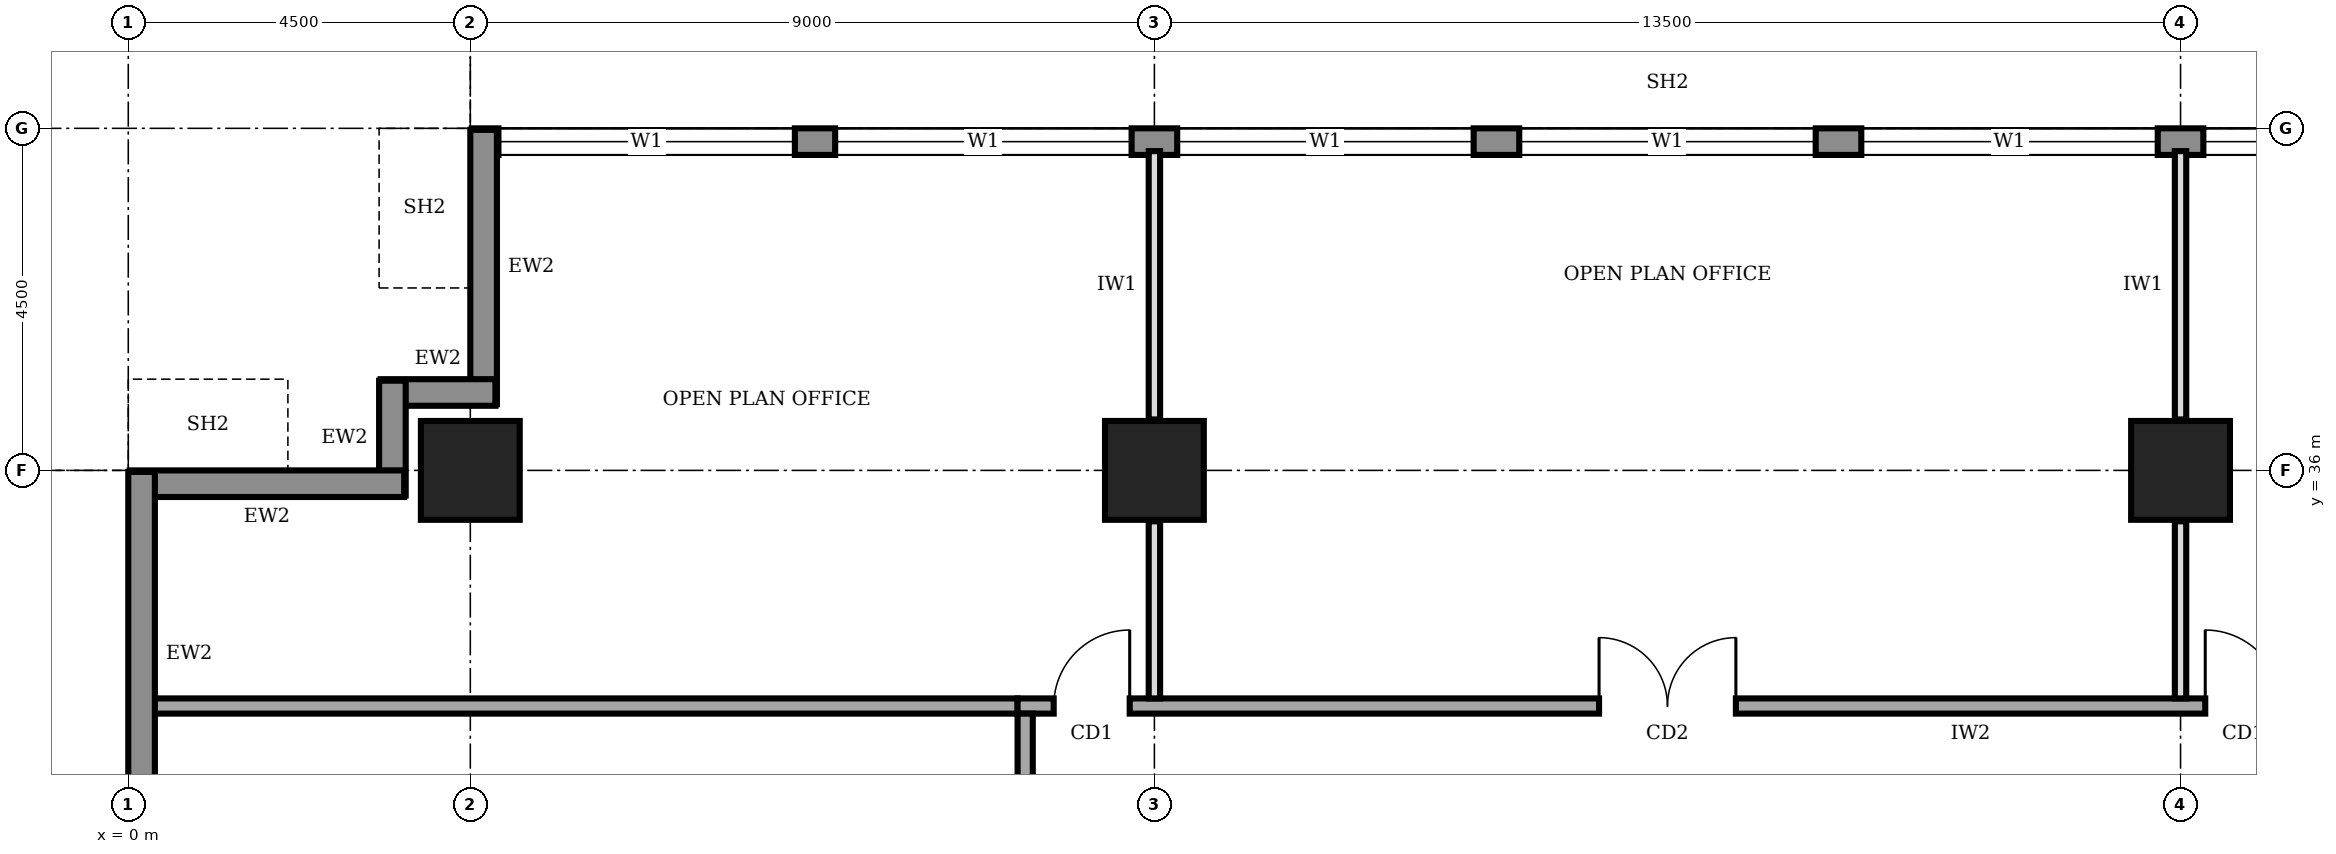
"""IFC4 building model, lengths in metres.
Left out: names, types, materials, properties, quantities, classifications, styles, units other than length and angle.
Written with IfcOpenShell. Run it as: python <this file> out.ifc"""

import sys

from ifc_helpers import new_model, si_unit, direction, frame, frame_2d, origin, origin_2d, place, context, subcontext, project, spatial, rectangle, extrude, element, fill, save


model = new_model("IFC4")
c1 = context("Model", 3, precision=1e-05, world=origin(), true_north=direction((0.0, 1.0)))
c2 = subcontext(c1, "Body", "Model", "MODEL_VIEW")
j1 = project(units=[si_unit("LENGTHUNIT", "METRE"), si_unit("PLANEANGLEUNIT", "RADIAN")], contexts=[c1])
p1 = place(None, origin())
s1 = spatial("IfcSite", under=j1, at=p1, CompositionType="ELEMENT")
p2 = place(p1, origin())
s2 = spatial("IfcBuilding", under=s1, at=p2, CompositionType="ELEMENT")
p3 = place(p2, frame((0.0, 0.0, 281.0)))
s3 = spatial("IfcBuildingStorey", under=s2, at=p3, CompositionType="ELEMENT", Elevation=281.0)
for number, where, z_axis, x_axis in (
    (1, (4.5, 36.0, 0.0), (0.0, 0.0, 1.0), (1.0, 0.0, 0.0)),
    (2, (13.5, 36.0, 0.0), (0.0, 0.0, 1.0), (1.0, 0.0, 0.0)),
    (3, (27.0, 36.0, 0.0), (0.0, 0.0, 1.0), (1.0, 0.0, 0.0)),
):
    element("IfcColumn", number, at=place(p3, frame(where, z_axis=z_axis, x_axis=x_axis)), inside=s3, PredefinedType="COLUMN", context=c2, shape_type="SweptSolid", body=[
        extrude(rectangle(XDim=1.3, YDim=1.3, at=origin_2d()), origin(), (0.0, 0.0, 1.0), 4.0),
    ])
p4 = place(p3, frame((35.98, 40.325, 0.0), z_axis=(0.0, 0.0, 1.0), x_axis=(-1.0, 0.0, 0.0)))
e4 = element("IfcWall", 4, at=p4, inside=s3, PredefinedType="STANDARD", context=c2, shape_type="SweptSolid", body=[
    extrude(rectangle(XDim=31.46, YDim=0.35, at=frame_2d((15.73, 0.0))), origin(), (0.0, 0.0, 1.0), 3.75),
])
p5 = place(p4, frame((27.21, 0.0, 0.9)))
e5 = element("IfcOpeningElement", 5, at=p5, cuts=e4, PredefinedType="OPENING", context=c2, shape_type="SweptSolid", body=[
    extrude(rectangle(XDim=3.9, YDim=2.2, at=frame_2d((1.95, 1.1))), frame((0.0, 0.185, 0.0), z_axis=(0.0, -1.0, 0.0), x_axis=(1.0, 0.0, 0.0)), (0.0, 0.0, 1.0), 0.37),
])
p6 = place(p4, frame((22.78, 0.0, 0.9)))
e6 = element("IfcOpeningElement", 6, at=p6, cuts=e4, PredefinedType="OPENING", context=c2, shape_type="SweptSolid", body=[
    extrude(rectangle(XDim=3.9, YDim=2.2, at=frame_2d((1.95, 1.1))), frame((0.0, 0.185, 0.0), z_axis=(0.0, -1.0, 0.0), x_axis=(1.0, 0.0, 0.0)), (0.0, 0.0, 1.0), 0.37),
])
p7 = place(p4, frame((18.28, 0.0, 0.9)))
e7 = element("IfcOpeningElement", 7, at=p7, cuts=e4, PredefinedType="OPENING", context=c2, shape_type="SweptSolid", body=[
    extrude(rectangle(XDim=3.9, YDim=2.2, at=frame_2d((1.95, 1.1))), frame((0.0, 0.185, 0.0), z_axis=(0.0, -1.0, 0.0), x_axis=(1.0, 0.0, 0.0)), (0.0, 0.0, 1.0), 0.37),
])
p8 = place(p4, frame((13.78, 0.0, 0.9)))
e8 = element("IfcOpeningElement", 8, at=p8, cuts=e4, PredefinedType="OPENING", context=c2, shape_type="SweptSolid", body=[
    extrude(rectangle(XDim=3.9, YDim=2.2, at=frame_2d((1.95, 1.1))), frame((0.0, 0.185, 0.0), z_axis=(0.0, -1.0, 0.0), x_axis=(1.0, 0.0, 0.0)), (0.0, 0.0, 1.0), 0.37),
])
p9 = place(p4, frame((9.28, 0.0, 0.9)))
e9 = element("IfcOpeningElement", 9, at=p9, cuts=e4, PredefinedType="OPENING", context=c2, shape_type="SweptSolid", body=[
    extrude(rectangle(XDim=3.9, YDim=2.2, at=frame_2d((1.95, 1.1))), frame((0.0, 0.185, 0.0), z_axis=(0.0, -1.0, 0.0), x_axis=(1.0, 0.0, 0.0)), (0.0, 0.0, 1.0), 0.37),
])
p10 = place(p4, frame((4.78, 0.0, 0.9)))
e10 = element("IfcOpeningElement", 10, at=p10, cuts=e4, PredefinedType="OPENING", context=c2, shape_type="SweptSolid", body=[
    extrude(rectangle(XDim=3.9, YDim=2.2, at=frame_2d((1.95, 1.1))), frame((0.0, 0.185, 0.0), z_axis=(0.0, -1.0, 0.0), x_axis=(1.0, 0.0, 0.0)), (0.0, 0.0, 1.0), 0.37),
])
p11 = place(p3, frame((4.675, 40.48, 0.0), z_axis=(0.0, 0.0, 1.0), x_axis=(0.0, -1.0, 0.0)))
e11 = element("IfcWall", 11, at=p11, inside=s3, PredefinedType="STANDARD", context=c2, shape_type="SweptSolid", body=[
    extrude(rectangle(XDim=3.61, YDim=0.35, at=frame_2d((1.805, 0.0))), origin(), (0.0, 0.0, 1.0), 2.85),
])
for number, where, z_axis, x_axis in (
    (12, (4.83, 37.025, 0.0), (0.0, 0.0, 1.0), (-1.0, 0.0, 0.0)),
    (13, (3.475, 37.18, 0.0), (0.0, 0.0, 1.0), (0.0, -1.0, 0.0)),
):
    element("IfcWall", number, at=place(p3, frame(where, z_axis=z_axis, x_axis=x_axis)), inside=s3, PredefinedType="STANDARD", context=c2, shape_type="SweptSolid", body=[
        extrude(rectangle(XDim=1.51, YDim=0.35, at=frame_2d((0.755, 0.0))), origin(), (0.0, 0.0, 1.0), 3.75),
    ])
p12 = place(p3, frame((3.63, 35.825, 0.0), z_axis=(0.0, 0.0, 1.0), x_axis=(-1.0, 0.0, 0.0)))
e14 = element("IfcWall", 14, at=p12, inside=s3, PredefinedType="STANDARD", context=c2, shape_type="SweptSolid", body=[
    extrude(rectangle(XDim=3.61, YDim=0.35, at=frame_2d((1.805, 0.0))), origin(), (0.0, 0.0, 1.0), 2.85),
])
p13 = place(p3, frame((0.175, 35.98, 0.0), z_axis=(0.0, 0.0, 1.0), x_axis=(0.0, -1.0, 0.0)))
e15 = element("IfcWall", 15, at=p13, inside=s3, PredefinedType="STANDARD", context=c2, shape_type="SweptSolid", body=[
    extrude(rectangle(XDim=31.46, YDim=0.35, at=frame_2d((15.73, 0.0))), origin(), (0.0, 0.0, 1.0), 3.75),
])
p14 = place(p13, frame((27.21, 0.0, 0.9)))
e16 = element("IfcOpeningElement", 16, at=p14, cuts=e15, PredefinedType="OPENING", context=c2, shape_type="SweptSolid", body=[
    extrude(rectangle(XDim=3.9, YDim=2.2, at=frame_2d((1.95, 1.1))), frame((0.0, 0.185, 0.0), z_axis=(0.0, -1.0, 0.0), x_axis=(1.0, 0.0, 0.0)), (0.0, 0.0, 1.0), 0.37),
])
p15 = place(p13, frame((22.78, 0.0, 0.9)))
e17 = element("IfcOpeningElement", 17, at=p15, cuts=e15, PredefinedType="OPENING", context=c2, shape_type="SweptSolid", body=[
    extrude(rectangle(XDim=3.9, YDim=2.2, at=frame_2d((1.95, 1.1))), frame((0.0, 0.185, 0.0), z_axis=(0.0, -1.0, 0.0), x_axis=(1.0, 0.0, 0.0)), (0.0, 0.0, 1.0), 0.37),
])
p16 = place(p13, frame((18.28, 0.0, 0.9)))
e18 = element("IfcOpeningElement", 18, at=p16, cuts=e15, PredefinedType="OPENING", context=c2, shape_type="SweptSolid", body=[
    extrude(rectangle(XDim=3.9, YDim=2.2, at=frame_2d((1.95, 1.1))), frame((0.0, 0.185, 0.0), z_axis=(0.0, -1.0, 0.0), x_axis=(1.0, 0.0, 0.0)), (0.0, 0.0, 1.0), 0.37),
])
p17 = place(p13, frame((13.78, 0.0, 0.9)))
e19 = element("IfcOpeningElement", 19, at=p17, cuts=e15, PredefinedType="OPENING", context=c2, shape_type="SweptSolid", body=[
    extrude(rectangle(XDim=3.9, YDim=2.2, at=frame_2d((1.95, 1.1))), frame((0.0, 0.185, 0.0), z_axis=(0.0, -1.0, 0.0), x_axis=(1.0, 0.0, 0.0)), (0.0, 0.0, 1.0), 0.37),
])
p18 = place(p13, frame((9.28, 0.0, 0.9)))
e20 = element("IfcOpeningElement", 20, at=p18, cuts=e15, PredefinedType="OPENING", context=c2, shape_type="SweptSolid", body=[
    extrude(rectangle(XDim=3.9, YDim=2.2, at=frame_2d((1.95, 1.1))), frame((0.0, 0.185, 0.0), z_axis=(0.0, -1.0, 0.0), x_axis=(1.0, 0.0, 0.0)), (0.0, 0.0, 1.0), 0.37),
])
p19 = place(p13, frame((4.78, 0.0, 0.9)))
e21 = element("IfcOpeningElement", 21, at=p19, cuts=e15, PredefinedType="OPENING", context=c2, shape_type="SweptSolid", body=[
    extrude(rectangle(XDim=3.9, YDim=2.2, at=frame_2d((1.95, 1.1))), frame((0.0, 0.185, 0.0), z_axis=(0.0, -1.0, 0.0), x_axis=(1.0, 0.0, 0.0)), (0.0, 0.0, 1.0), 0.37),
])
p20 = place(p3, frame((28.6, 32.9, 0.0), z_axis=(0.0, 0.0, 1.0), x_axis=(-1.0, 0.0, 0.0)))
e22 = element("IfcWall", 22, at=p20, inside=s3, PredefinedType="SOLIDWALL", context=c2, shape_type="SweptSolid", body=[
    extrude(rectangle(XDim=16.9, YDim=0.2, at=frame_2d((8.45, 0.0))), origin(), (0.0, 0.0, 1.0), 3.75),
])
p21 = place(p20, frame((15.425, 0.0, 0.0)))
e23 = element("IfcOpeningElement", 23, at=p21, cuts=e22, PredefinedType="OPENING", context=c2, shape_type="SweptSolid", body=[
    extrude(rectangle(XDim=1.0, YDim=2.1, at=frame_2d((0.5, 1.05))), frame((0.0, 0.11, 0.0), z_axis=(0.0, -1.0, 0.0), x_axis=(1.0, 0.0, 0.0)), (0.0, 0.0, 1.0), 0.22),
])
p22 = place(p20, frame((7.45, 0.0, 0.0)))
e24 = element("IfcOpeningElement", 24, at=p22, cuts=e22, PredefinedType="OPENING", context=c2, shape_type="SweptSolid", body=[
    extrude(rectangle(XDim=1.8, YDim=2.1, at=frame_2d((0.9, 1.05))), frame((0.0, 0.11, 0.0), z_axis=(0.0, -1.0, 0.0), x_axis=(1.0, 0.0, 0.0)), (0.0, 0.0, 1.0), 0.22),
])
p23 = place(p20, frame((0.275, 0.0, 0.0)))
e25 = element("IfcOpeningElement", 25, at=p23, cuts=e22, PredefinedType="OPENING", context=c2, shape_type="SweptSolid", body=[
    extrude(rectangle(XDim=1.0, YDim=2.1, at=frame_2d((0.5, 1.05))), frame((0.0, 0.11, 0.0), z_axis=(0.0, -1.0, 0.0), x_axis=(1.0, 0.0, 0.0)), (0.0, 0.0, 1.0), 0.22),
])
p24 = place(p3, frame((11.8, 32.8, 0.0), z_axis=(0.0, 0.0, 1.0), x_axis=(0.0, -1.0, 0.0)))
e26 = element("IfcWall", 26, at=p24, inside=s3, PredefinedType="SOLIDWALL", context=c2, shape_type="SweptSolid", body=[
    extrude(rectangle(XDim=23.8, YDim=0.2, at=frame_2d((11.9, 0.0))), origin(), (0.0, 0.0, 1.0), 3.75),
])
p25 = place(p24, frame((21.05, 0.0, 0.0)))
e27 = element("IfcOpeningElement", 27, at=p25, cuts=e26, PredefinedType="OPENING", context=c2, shape_type="SweptSolid", body=[
    extrude(rectangle(XDim=1.0, YDim=2.1, at=frame_2d((0.5, 1.05))), frame((0.0, 0.11, 0.0), z_axis=(0.0, -1.0, 0.0), x_axis=(1.0, 0.0, 0.0)), (0.0, 0.0, 1.0), 0.22),
])
p26 = place(p24, frame((17.65, 0.0, 0.0)))
e28 = element("IfcOpeningElement", 28, at=p26, cuts=e26, PredefinedType="OPENING", context=c2, shape_type="SweptSolid", body=[
    extrude(rectangle(XDim=0.9, YDim=2.1, at=frame_2d((0.45, 1.05))), frame((0.0, 0.11, 0.0), z_axis=(0.0, -1.0, 0.0), x_axis=(1.0, 0.0, 0.0)), (0.0, 0.0, 1.0), 0.22),
])
p27 = place(p24, frame((14.45, 0.0, 0.0)))
e29 = element("IfcOpeningElement", 29, at=p27, cuts=e26, PredefinedType="OPENING", context=c2, shape_type="SweptSolid", body=[
    extrude(rectangle(XDim=0.9, YDim=2.1, at=frame_2d((0.45, 1.05))), frame((0.0, 0.11, 0.0), z_axis=(0.0, -1.0, 0.0), x_axis=(1.0, 0.0, 0.0)), (0.0, 0.0, 1.0), 0.22),
])
p28 = place(p24, frame((8.9, 0.0, 0.0)))
e30 = element("IfcOpeningElement", 30, at=p28, cuts=e26, PredefinedType="OPENING", context=c2, shape_type="SweptSolid", body=[
    extrude(rectangle(XDim=0.9, YDim=2.1, at=frame_2d((0.45, 1.05))), frame((0.0, 0.11, 0.0), z_axis=(0.0, -1.0, 0.0), x_axis=(1.0, 0.0, 0.0)), (0.0, 0.0, 1.0), 0.22),
])
p29 = place(p24, frame((6.3, 0.0, 0.0)))
e31 = element("IfcOpeningElement", 31, at=p29, cuts=e26, PredefinedType="OPENING", context=c2, shape_type="SweptSolid", body=[
    extrude(rectangle(XDim=1.0, YDim=2.1, at=frame_2d((0.5, 1.05))), frame((0.0, 0.11, 0.0), z_axis=(0.0, -1.0, 0.0), x_axis=(1.0, 0.0, 0.0)), (0.0, 0.0, 1.0), 0.22),
])
p30 = place(p24, frame((11.4, 0.0, 0.0)))
e32 = element("IfcOpeningElement", 32, at=p30, cuts=e26, PredefinedType="OPENING", context=c2, shape_type="SweptSolid", body=[
    extrude(rectangle(XDim=1.0, YDim=2.1, at=frame_2d((0.5, 1.05))), frame((0.0, 0.11, 0.0), z_axis=(0.0, -1.0, 0.0), x_axis=(1.0, 0.0, 0.0)), (0.0, 0.0, 1.0), 0.22),
])
p31 = place(p24, frame((2.3, 0.0, 0.0)))
e33 = element("IfcOpeningElement", 33, at=p31, cuts=e26, PredefinedType="OPENING", context=c2, shape_type="SweptSolid", body=[
    extrude(rectangle(XDim=1.0, YDim=2.1, at=frame_2d((0.5, 1.05))), frame((0.0, 0.11, 0.0), z_axis=(0.0, -1.0, 0.0), x_axis=(1.0, 0.0, 0.0)), (0.0, 0.0, 1.0), 0.22),
])
p32 = place(p3, frame((0.3, 32.9, 0.0), z_axis=(0.0, 0.0, 1.0), x_axis=(1.0, 0.0, 0.0)))
e34 = element("IfcWall", 34, at=p32, inside=s3, PredefinedType="SOLIDWALL", context=c2, shape_type="SweptSolid", body=[
    extrude(rectangle(XDim=11.4, YDim=0.2, at=frame_2d((5.7, 0.0))), origin(), (0.0, 0.0, 1.0), 3.75),
])
p33 = place(p3, frame((13.5, 33.0, 0.0), z_axis=(0.0, 0.0, 1.0), x_axis=(0.0, 1.0, 0.0)))
e35 = element("IfcWall", 35, at=p33, inside=s3, PredefinedType="PARTITIONING", context=c2, shape_type="SweptSolid", body=[
    extrude(rectangle(XDim=2.33, YDim=0.15, at=frame_2d((1.165, 0.0))), origin(), (0.0, 0.0, 1.0), 2.85),
])
p34 = place(p3, frame((13.5, 36.67, 0.0), z_axis=(0.0, 0.0, 1.0), x_axis=(0.0, 1.0, 0.0)))
e36 = element("IfcWall", 36, at=p34, inside=s3, PredefinedType="PARTITIONING", context=c2, shape_type="SweptSolid", body=[
    extrude(rectangle(XDim=3.53, YDim=0.15, at=frame_2d((1.765, 0.0))), origin(), (0.0, 0.0, 1.0), 2.85),
])
p35 = place(p3, frame((27.0, 33.0, 0.0), z_axis=(0.0, 0.0, 1.0), x_axis=(0.0, 1.0, 0.0)))
e37 = element("IfcWall", 37, at=p35, inside=s3, PredefinedType="PARTITIONING", context=c2, shape_type="SweptSolid", body=[
    extrude(rectangle(XDim=2.33, YDim=0.15, at=frame_2d((1.165, 0.0))), origin(), (0.0, 0.0, 1.0), 2.85),
])
p36 = place(p3, frame((27.0, 36.67, 0.0), z_axis=(0.0, 0.0, 1.0), x_axis=(0.0, 1.0, 0.0)))
e38 = element("IfcWall", 38, at=p36, inside=s3, PredefinedType="PARTITIONING", context=c2, shape_type="SweptSolid", body=[
    extrude(rectangle(XDim=3.53, YDim=0.15, at=frame_2d((1.765, 0.0))), origin(), (0.0, 0.0, 1.0), 2.85),
])
p37 = place(p5, origin())
e39 = element("IfcWindow", 39, at=p37, inside=s3, PartitioningType="SINGLE_PANEL", PredefinedType="WINDOW", context=c2, shape_type="SweptSolid", body=[
    extrude(rectangle(XDim=3.9, YDim=2.2, at=frame_2d((1.95, 1.1))), frame((0.0, 0.03, 0.0), z_axis=(0.0, -1.0, 0.0), x_axis=(1.0, 0.0, 0.0)), (0.0, 0.0, 1.0), 0.06),
])
fill(e5, e39)
p38 = place(p6, origin())
e40 = element("IfcWindow", 40, at=p38, inside=s3, PartitioningType="SINGLE_PANEL", PredefinedType="WINDOW", context=c2, shape_type="SweptSolid", body=[
    extrude(rectangle(XDim=3.9, YDim=2.2, at=frame_2d((1.95, 1.1))), frame((0.0, 0.03, 0.0), z_axis=(0.0, -1.0, 0.0), x_axis=(1.0, 0.0, 0.0)), (0.0, 0.0, 1.0), 0.06),
])
fill(e6, e40)
p39 = place(p7, origin())
e41 = element("IfcWindow", 41, at=p39, inside=s3, PartitioningType="SINGLE_PANEL", PredefinedType="WINDOW", context=c2, shape_type="SweptSolid", body=[
    extrude(rectangle(XDim=3.9, YDim=2.2, at=frame_2d((1.95, 1.1))), frame((0.0, 0.03, 0.0), z_axis=(0.0, -1.0, 0.0), x_axis=(1.0, 0.0, 0.0)), (0.0, 0.0, 1.0), 0.06),
])
fill(e7, e41)
p40 = place(p8, origin())
e42 = element("IfcWindow", 42, at=p40, inside=s3, PartitioningType="SINGLE_PANEL", PredefinedType="WINDOW", context=c2, shape_type="SweptSolid", body=[
    extrude(rectangle(XDim=3.9, YDim=2.2, at=frame_2d((1.95, 1.1))), frame((0.0, 0.03, 0.0), z_axis=(0.0, -1.0, 0.0), x_axis=(1.0, 0.0, 0.0)), (0.0, 0.0, 1.0), 0.06),
])
fill(e8, e42)
p41 = place(p9, origin())
e43 = element("IfcWindow", 43, at=p41, inside=s3, PartitioningType="SINGLE_PANEL", PredefinedType="WINDOW", context=c2, shape_type="SweptSolid", body=[
    extrude(rectangle(XDim=3.9, YDim=2.2, at=frame_2d((1.95, 1.1))), frame((0.0, 0.03, 0.0), z_axis=(0.0, -1.0, 0.0), x_axis=(1.0, 0.0, 0.0)), (0.0, 0.0, 1.0), 0.06),
])
fill(e9, e43)
p42 = place(p10, origin())
e44 = element("IfcWindow", 44, at=p42, inside=s3, PartitioningType="SINGLE_PANEL", PredefinedType="WINDOW", context=c2, shape_type="SweptSolid", body=[
    extrude(rectangle(XDim=3.9, YDim=2.2, at=frame_2d((1.95, 1.1))), frame((0.0, 0.03, 0.0), z_axis=(0.0, -1.0, 0.0), x_axis=(1.0, 0.0, 0.0)), (0.0, 0.0, 1.0), 0.06),
])
fill(e10, e44)
p43 = place(p21, frame((1.0, 0.0, 0.0), z_axis=(0.0, 0.0, 1.0), x_axis=(-1.0, 0.0, 0.0)))
e45 = element("IfcDoor", 45, at=p43, inside=s3, OperationType="SINGLE_SWING_RIGHT", PredefinedType="DOOR", context=c2, shape_type="SweptSolid", body=[
    extrude(rectangle(XDim=1.0, YDim=2.1, at=frame_2d((0.5, 1.05))), frame((0.0, 0.025, 0.0), z_axis=(0.0, -1.0, 0.0), x_axis=(1.0, 0.0, 0.0)), (0.0, 0.0, 1.0), 0.05),
])
fill(e23, e45)
p44 = place(p22, frame((1.8, 0.0, 0.0), z_axis=(0.0, 0.0, 1.0), x_axis=(-1.0, 0.0, 0.0)))
e46 = element("IfcDoor", 46, at=p44, inside=s3, OperationType="DOUBLE_DOOR_SINGLE_SWING", PredefinedType="DOOR", context=c2, shape_type="SweptSolid", body=[
    extrude(rectangle(XDim=1.8, YDim=2.1, at=frame_2d((0.9, 1.05))), frame((0.0, 0.025, 0.0), z_axis=(0.0, -1.0, 0.0), x_axis=(1.0, 0.0, 0.0)), (0.0, 0.0, 1.0), 0.05),
])
fill(e24, e46)
p45 = place(p23, frame((1.0, 0.0, 0.0), z_axis=(0.0, 0.0, 1.0), x_axis=(-1.0, 0.0, 0.0)))
e47 = element("IfcDoor", 47, at=p45, inside=s3, OperationType="SINGLE_SWING_LEFT", PredefinedType="DOOR", context=c2, shape_type="SweptSolid", body=[
    extrude(rectangle(XDim=1.0, YDim=2.1, at=frame_2d((0.5, 1.05))), frame((0.0, 0.025, 0.0), z_axis=(0.0, -1.0, 0.0), x_axis=(1.0, 0.0, 0.0)), (0.0, 0.0, 1.0), 0.05),
])
fill(e25, e47)
save(model, sys.argv[1])
